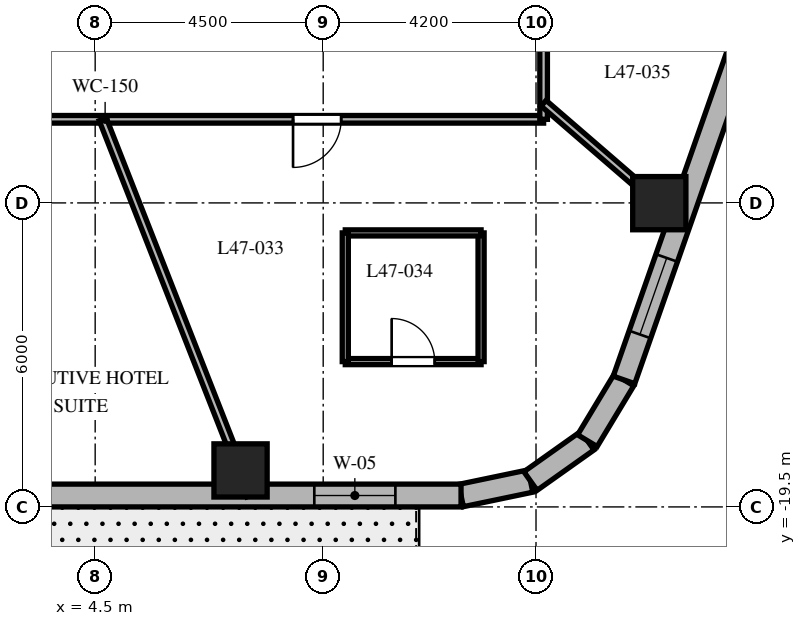
"""IFC4 building model, lengths in metres.
Left out: names, types, materials, properties, quantities, classifications, styles, units other than length and angle.
Written with IfcOpenShell. Run it as: python <this file> out.ifc"""

import sys

from ifc_helpers import new_model, si_unit, direction, frame, frame_2d, origin, origin_2d, place, context, subcontext, project, spatial, rectangle, extrude, element, fill, save


model = new_model("IFC4")
c1 = context("Model", 3, precision=1e-05, world=origin(), true_north=direction((0.0, 1.0)))
c2 = subcontext(c1, "Body", "Model", "MODEL_VIEW")
j1 = project(units=[si_unit("LENGTHUNIT", "METRE"), si_unit("PLANEANGLEUNIT", "RADIAN")], contexts=[c1])
p1 = place(None, origin())
s1 = spatial("IfcSite", under=j1, at=p1, CompositionType="ELEMENT")
p2 = place(p1, origin())
s2 = spatial("IfcBuilding", under=s1, at=p2, CompositionType="ELEMENT")
p3 = place(p2, frame((0.0, 0.0, 190.4)))
s3 = spatial("IfcBuildingStorey", under=s2, at=p3, CompositionType="ELEMENT", Elevation=190.4)
for number, where, z_axis, x_axis in (
    (1, (7.369, -18.78, 0.0), (0.0, 0.0, 1.0), (1.0, 0.0, 0.0)),
    (2, (15.633, -13.505, 0.0), (0.0, 0.0, 1.0), (1.0, 0.0, 0.0)),
):
    element("IfcColumn", number, at=place(p3, frame(where, z_axis=z_axis, x_axis=x_axis)), inside=s3, PredefinedType="COLUMN", context=c2, shape_type="SweptSolid", body=[
        extrude(rectangle(XDim=1.05, YDim=1.05, at=origin_2d()), origin(), (0.0, 0.0, 1.0), 3.7),
    ])
p4 = place(p3, frame((11.72, -19.275, 0.0), z_axis=(0.0, 0.0, 1.0), x_axis=(0.97893106758, 0.204191001093, 0.0)))
e3 = element("IfcWall", 3, at=p4, inside=s3, PredefinedType="SOLIDWALL", context=c2, shape_type="SweptSolid", body=[
    extrude(rectangle(XDim=1.4, YDim=0.45, at=frame_2d((0.7, 0.0))), origin(), (0.0, 0.0, 1.0), 3.4),
])
p5 = place(p3, frame((13.091, -18.989, 0.0), z_axis=(0.0, 0.0, 1.0), x_axis=(0.815574637848, 0.578651890258, 0.0)))
e4 = element("IfcWall", 4, at=p5, inside=s3, PredefinedType="SOLIDWALL", context=c2, shape_type="SweptSolid", body=[
    extrude(rectangle(XDim=1.377, YDim=0.45, at=frame_2d((0.688, 0.0))), origin(), (0.0, 0.0, 1.0), 3.4),
])
p6 = place(p3, frame((14.214, -18.192, 0.0), z_axis=(0.0, 0.0, 1.0), x_axis=(0.516340945502, 0.856383108193, 0.0)))
e5 = element("IfcWall", 5, at=p6, inside=s3, PredefinedType="SOLIDWALL", context=c2, shape_type="SweptSolid", body=[
    extrude(rectangle(XDim=1.4, YDim=0.45, at=frame_2d((0.7, 0.0))), origin(), (0.0, 0.0, 1.0), 3.4),
])
p7 = place(p3, frame((-10.108, -19.275, 0.0), z_axis=(0.0, 0.0, 1.0), x_axis=(1.0, 0.0, 0.0)))
e6 = element("IfcWall", 6, at=p7, inside=s3, PredefinedType="SOLIDWALL", context=c2, shape_type="SweptSolid", body=[
    extrude(rectangle(XDim=21.829, YDim=0.45, at=frame_2d((10.915, 0.0))), origin(), (0.0, 0.0, 1.0), 3.4),
])
p8 = place(p7, frame((5.503, 0.0, 0.0)))
e7 = element("IfcOpeningElement", 7, at=p8, cuts=e6, PredefinedType="OPENING", context=c2, shape_type="SweptSolid", body=[
    extrude(rectangle(XDim=1.0, YDim=2.15, at=frame_2d((0.5, 1.075))), frame((0.0, 0.235, 0.0), z_axis=(0.0, -1.0, 0.0), x_axis=(1.0, 0.0, 0.0)), (0.0, 0.0, 1.0), 0.47),
])
p9 = place(p7, frame((1.297, 0.0, 0.8)))
e8 = element("IfcOpeningElement", 8, at=p9, cuts=e6, PredefinedType="OPENING", context=c2, shape_type="SweptSolid", body=[
    extrude(rectangle(XDim=1.6, YDim=1.75, at=frame_2d((0.8, 0.875))), frame((0.0, 0.235, 0.0), z_axis=(0.0, -1.0, 0.0), x_axis=(1.0, 0.0, 0.0)), (0.0, 0.0, 1.0), 0.47),
])
p10 = place(p7, frame((10.115, 0.0, 0.8)))
e9 = element("IfcOpeningElement", 9, at=p10, cuts=e6, PredefinedType="OPENING", context=c2, shape_type="SweptSolid", body=[
    extrude(rectangle(XDim=1.6, YDim=1.75, at=frame_2d((0.8, 0.875))), frame((0.0, 0.235, 0.0), z_axis=(0.0, -1.0, 0.0), x_axis=(1.0, 0.0, 0.0)), (0.0, 0.0, 1.0), 0.47),
])
p11 = place(p7, frame((18.933, 0.0, 0.8)))
e10 = element("IfcOpeningElement", 10, at=p11, cuts=e6, PredefinedType="OPENING", context=c2, shape_type="SweptSolid", body=[
    extrude(rectangle(XDim=1.6, YDim=1.75, at=frame_2d((0.8, 0.875))), frame((0.0, 0.235, 0.0), z_axis=(0.0, -1.0, 0.0), x_axis=(1.0, 0.0, 0.0)), (0.0, 0.0, 1.0), 0.47),
])
p12 = place(p3, frame((14.937, -16.993, 0.0), z_axis=(0.0, 0.0, 1.0), x_axis=(0.330431575061, 0.943829949834, 0.0)))
e11 = element("IfcWall", 11, at=p12, inside=s3, PredefinedType="SOLIDWALL", context=c2, shape_type="SweptSolid", body=[
    extrude(rectangle(XDim=17.689, YDim=0.45, at=frame_2d((8.844, 0.0))), origin(), (0.0, 0.0, 1.0), 3.4),
])
p13 = place(p12, frame((0.95, 0.0, 0.8)))
e12 = element("IfcOpeningElement", 12, at=p13, cuts=e11, PredefinedType="OPENING", context=c2, shape_type="SweptSolid", body=[
    extrude(rectangle(XDim=1.6, YDim=1.75, at=frame_2d((0.8, 0.875))), frame((0.0, 0.235, 0.0), z_axis=(0.0, -1.0, 0.0), x_axis=(1.0, 0.0, 0.0)), (0.0, 0.0, 1.0), 0.47),
])
p14 = place(p12, frame((7.99, 0.0, 0.8)))
e13 = element("IfcOpeningElement", 13, at=p14, cuts=e11, PredefinedType="OPENING", context=c2, shape_type="SweptSolid", body=[
    extrude(rectangle(XDim=1.6, YDim=1.75, at=frame_2d((0.8, 0.875))), frame((0.0, 0.235, 0.0), z_axis=(0.0, -1.0, 0.0), x_axis=(1.0, 0.0, 0.0)), (0.0, 0.0, 1.0), 0.47),
])
p15 = place(p12, frame((15.084, 0.0, 0.8)))
e14 = element("IfcOpeningElement", 14, at=p15, cuts=e11, PredefinedType="OPENING", context=c2, shape_type="SweptSolid", body=[
    extrude(rectangle(XDim=1.6, YDim=1.75, at=frame_2d((0.8, 0.875))), frame((0.0, 0.235, 0.0), z_axis=(0.0, -1.0, 0.0), x_axis=(1.0, 0.0, 0.0)), (0.0, 0.0, 1.0), 0.47),
])
p16 = place(p3, frame((13.35, -11.85, 0.0), z_axis=(0.0, 0.0, 1.0), x_axis=(-1.0, 0.0, 0.0)))
e15 = element("IfcWall", 15, at=p16, inside=s3, PredefinedType="PARTITIONING", context=c2, shape_type="SweptSolid", body=[
    extrude(rectangle(XDim=26.7, YDim=0.15, at=frame_2d((13.35, 0.0))), origin(), (0.0, 0.0, 1.0), 2.84),
])
p17 = place(p16, frame((22.459, 0.0, 0.0)))
e16 = element("IfcOpeningElement", 16, at=p17, cuts=e15, PredefinedType="OPENING", context=c2, shape_type="SweptSolid", body=[
    extrude(rectangle(XDim=0.9, YDim=2.03, at=frame_2d((0.45, 1.015))), frame((0.0, 0.085, 0.0), z_axis=(0.0, -1.0, 0.0), x_axis=(1.0, 0.0, 0.0)), (0.0, 0.0, 1.0), 0.17),
])
p18 = place(p16, frame((18.304, 0.0, 0.0)))
e17 = element("IfcOpeningElement", 17, at=p18, cuts=e15, PredefinedType="OPENING", context=c2, shape_type="SweptSolid", body=[
    extrude(rectangle(XDim=0.9, YDim=2.03, at=frame_2d((0.45, 1.015))), frame((0.0, 0.085, 0.0), z_axis=(0.0, -1.0, 0.0), x_axis=(1.0, 0.0, 0.0)), (0.0, 0.0, 1.0), 0.17),
])
p19 = place(p16, frame((12.362, 0.0, 0.0)))
e18 = element("IfcOpeningElement", 18, at=p19, cuts=e15, PredefinedType="OPENING", context=c2, shape_type="SweptSolid", body=[
    extrude(rectangle(XDim=0.95, YDim=2.03, at=frame_2d((0.475, 1.015))), frame((0.0, 0.085, 0.0), z_axis=(0.0, -1.0, 0.0), x_axis=(1.0, 0.0, 0.0)), (0.0, 0.0, 1.0), 0.17),
])
p20 = place(p16, frame((3.995, 0.0, 0.0)))
e19 = element("IfcOpeningElement", 19, at=p20, cuts=e15, PredefinedType="OPENING", context=c2, shape_type="SweptSolid", body=[
    extrude(rectangle(XDim=0.95, YDim=2.03, at=frame_2d((0.475, 1.015))), frame((0.0, 0.085, 0.0), z_axis=(0.0, -1.0, 0.0), x_axis=(1.0, 0.0, 0.0)), (0.0, 0.0, 1.0), 0.17),
])
p21 = place(p3, frame((13.35, 11.85, 0.0), z_axis=(0.0, 0.0, 1.0), x_axis=(0.0, -1.0, 0.0)))
e20 = element("IfcWall", 20, at=p21, inside=s3, PredefinedType="PARTITIONING", context=c2, shape_type="SweptSolid", body=[
    extrude(rectangle(XDim=23.7, YDim=0.15, at=frame_2d((11.85, 0.0))), origin(), (0.0, 0.0, 1.0), 2.84),
])
p22 = place(p21, frame((5.951, 0.0, 0.0)))
e21 = element("IfcOpeningElement", 21, at=p22, cuts=e20, PredefinedType="OPENING", context=c2, shape_type="SweptSolid", body=[
    extrude(rectangle(XDim=0.9, YDim=2.03, at=frame_2d((0.45, 1.015))), frame((0.0, 0.085, 0.0), z_axis=(0.0, -1.0, 0.0), x_axis=(1.0, 0.0, 0.0)), (0.0, 0.0, 1.0), 0.17),
])
p23 = place(p21, frame((1.993, 0.0, 0.0)))
e22 = element("IfcOpeningElement", 22, at=p23, cuts=e20, PredefinedType="OPENING", context=c2, shape_type="SweptSolid", body=[
    extrude(rectangle(XDim=0.9, YDim=2.03, at=frame_2d((0.45, 1.015))), frame((0.0, 0.085, 0.0), z_axis=(0.0, -1.0, 0.0), x_axis=(1.0, 0.0, 0.0)), (0.0, 0.0, 1.0), 0.17),
])
p24 = place(p21, frame((18.364, 0.0, 0.0)))
e23 = element("IfcOpeningElement", 23, at=p24, cuts=e20, PredefinedType="OPENING", context=c2, shape_type="SweptSolid", body=[
    extrude(rectangle(XDim=1.0, YDim=2.03, at=frame_2d((0.5, 1.015))), frame((0.0, 0.085, 0.0), z_axis=(0.0, -1.0, 0.0), x_axis=(1.0, 0.0, 0.0)), (0.0, 0.0, 1.0), 0.17),
])
p25 = place(p3, frame((4.65, -11.85, 0.0), z_axis=(0.0, 0.0, 1.0), x_axis=(0.365265947993, -0.930903210456, 0.0)))
e24 = element("IfcWall", 24, at=p25, inside=s3, PredefinedType="PARTITIONING", context=c2, shape_type="SweptSolid", body=[
    extrude(rectangle(XDim=7.976, YDim=0.15, at=frame_2d((3.988, 0.0))), origin(), (0.0, 0.0, 1.0), 2.64),
])
p26 = place(p3, frame((13.35, -11.533, 0.0), z_axis=(0.0, 0.0, 1.0), x_axis=(0.756711647314, -0.65374879183, 0.0)))
e25 = element("IfcWall", 25, at=p26, inside=s3, PredefinedType="PARTITIONING", context=c2, shape_type="SweptSolid", body=[
    extrude(rectangle(XDim=3.55, YDim=0.15, at=frame_2d((1.775, 0.0))), origin(), (0.0, 0.0, 1.0), 2.64),
])
p27 = place(p3, frame((9.436, -16.632, 0.0), z_axis=(0.0, 0.0, 1.0), x_axis=(1.0, 0.0, 0.0)))
e26 = element("IfcWall", 26, at=p27, inside=s3, PredefinedType="PARTITIONING", context=c2, shape_type="SweptSolid", body=[
    extrude(rectangle(XDim=2.68, YDim=0.12, at=frame_2d((1.34, 0.0))), origin(), (0.0, 0.0, 1.0), 2.64),
])
p28 = place(p27, frame((0.915, 0.0, 0.0)))
e27 = element("IfcOpeningElement", 27, at=p28, cuts=e26, PredefinedType="OPENING", context=c2, shape_type="SweptSolid", body=[
    extrude(rectangle(XDim=0.85, YDim=2.03, at=frame_2d((0.425, 1.015))), frame((0.0, 0.07, 0.0), z_axis=(0.0, -1.0, 0.0), x_axis=(1.0, 0.0, 0.0)), (0.0, 0.0, 1.0), 0.14),
])
p29 = place(p3, frame((12.116, -16.632, 0.0), z_axis=(0.0, 0.0, 1.0), x_axis=(0.0, 1.0, 0.0)))
e28 = element("IfcWall", 28, at=p29, inside=s3, PredefinedType="PARTITIONING", context=c2, shape_type="SweptSolid", body=[
    extrude(rectangle(XDim=2.54, YDim=0.12, at=frame_2d((1.27, 0.0))), origin(), (0.0, 0.0, 1.0), 2.64),
])
p30 = place(p3, frame((12.116, -14.092, 0.0), z_axis=(0.0, 0.0, 1.0), x_axis=(-1.0, 0.0, 0.0)))
e29 = element("IfcWall", 29, at=p30, inside=s3, PredefinedType="PARTITIONING", context=c2, shape_type="SweptSolid", body=[
    extrude(rectangle(XDim=2.68, YDim=0.12, at=frame_2d((1.34, 0.0))), origin(), (0.0, 0.0, 1.0), 2.927),
])
p31 = place(p3, frame((9.436, -14.092, 0.0), z_axis=(0.0, 0.0, 1.0), x_axis=(0.0, -1.0, 0.0)))
e30 = element("IfcWall", 30, at=p31, inside=s3, PredefinedType="PARTITIONING", context=c2, shape_type="SweptSolid", body=[
    extrude(rectangle(XDim=2.54, YDim=0.12, at=frame_2d((1.27, 0.0))), origin(), (0.0, 0.0, 1.0), 2.927),
])
p32 = place(p11, origin())
e31 = element("IfcWindow", 31, at=p32, inside=s3, PartitioningType="SINGLE_PANEL", PredefinedType="WINDOW", context=c2, shape_type="SweptSolid", body=[
    extrude(rectangle(XDim=1.6, YDim=1.75, at=frame_2d((0.8, 0.875))), frame((0.0, 0.03, 0.0), z_axis=(0.0, -1.0, 0.0), x_axis=(1.0, 0.0, 0.0)), (0.0, 0.0, 1.0), 0.06),
])
fill(e10, e31)
p33 = place(p13, origin())
e32 = element("IfcWindow", 32, at=p33, inside=s3, PartitioningType="SINGLE_PANEL", PredefinedType="WINDOW", context=c2, shape_type="SweptSolid", body=[
    extrude(rectangle(XDim=1.6, YDim=1.75, at=frame_2d((0.8, 0.875))), frame((0.0, 0.03, 0.0), z_axis=(0.0, -1.0, 0.0), x_axis=(1.0, 0.0, 0.0)), (0.0, 0.0, 1.0), 0.06),
])
fill(e12, e32)
p34 = place(p20, origin())
e33 = element("IfcDoor", 33, at=p34, inside=s3, OperationType="SINGLE_SWING_RIGHT", PredefinedType="DOOR", context=c2, shape_type="SweptSolid", body=[
    extrude(rectangle(XDim=0.95, YDim=2.03, at=frame_2d((0.475, 1.015))), frame((0.0, 0.025, 0.0), z_axis=(0.0, -1.0, 0.0), x_axis=(1.0, 0.0, 0.0)), (0.0, 0.0, 1.0), 0.05),
])
fill(e19, e33)
p35 = place(p28, origin())
e34 = element("IfcDoor", 34, at=p35, inside=s3, OperationType="SINGLE_SWING_LEFT", PredefinedType="DOOR", context=c2, shape_type="SweptSolid", body=[
    extrude(rectangle(XDim=0.85, YDim=2.03, at=frame_2d((0.425, 1.015))), frame((0.0, 0.025, 0.0), z_axis=(0.0, -1.0, 0.0), x_axis=(1.0, 0.0, 0.0)), (0.0, 0.0, 1.0), 0.05),
])
fill(e27, e34)
save(model, sys.argv[1])
